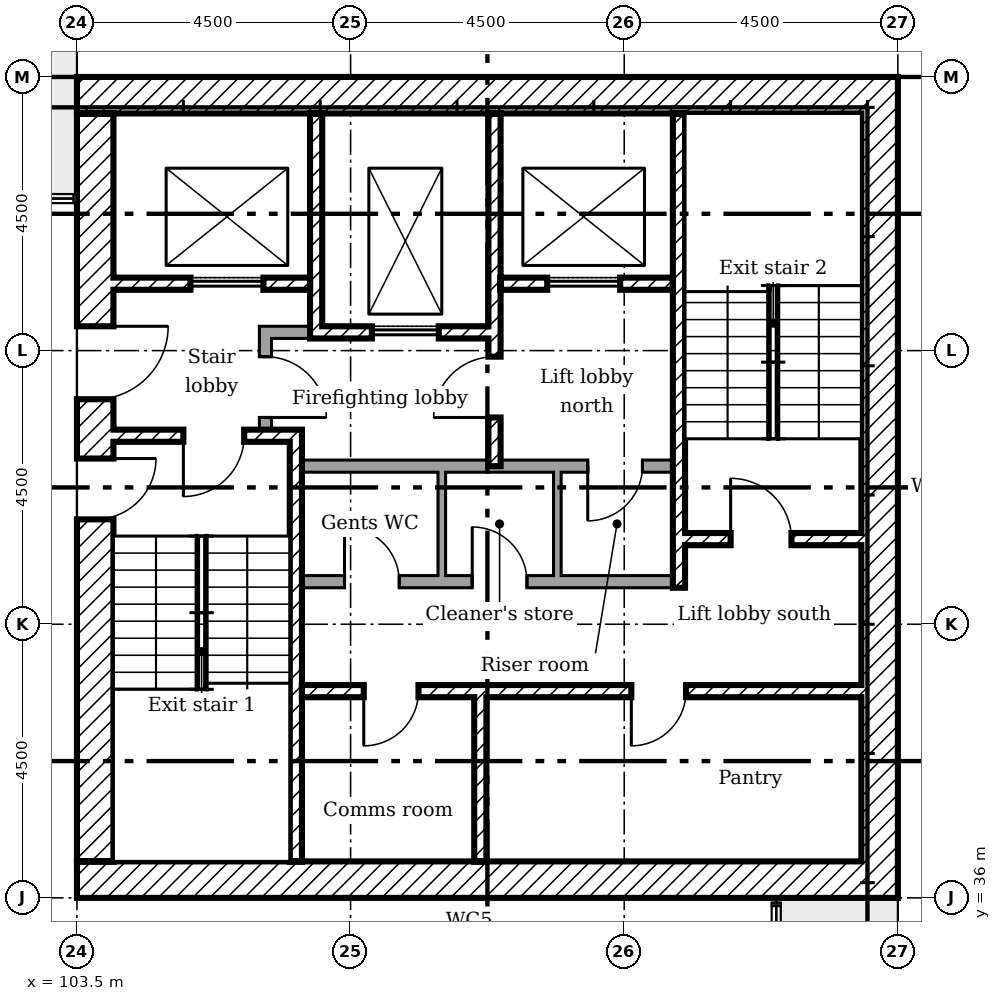
"""IFC4 building model, lengths in metres.
Left out: names, types, materials, properties, quantities, classifications, styles, units other than length and angle.
Written with IfcOpenShell. Run it as: python <this file> out.ifc"""

import sys

from ifc_helpers import new_model, si_unit, direction, frame, frame_2d, origin, place, context, subcontext, project, spatial, rectangle, extrude, element, fill, save


model = new_model("IFC4")
c1 = context("Model", 3, precision=1e-05, world=origin(), true_north=direction((0.0, 1.0)))
c2 = subcontext(c1, "Body", "Model", "MODEL_VIEW")
j1 = project(units=[si_unit("LENGTHUNIT", "METRE"), si_unit("PLANEANGLEUNIT", "RADIAN")], contexts=[c1])
p1 = place(None, origin())
s1 = spatial("IfcSite", under=j1, at=p1, CompositionType="ELEMENT")
p2 = place(p1, origin())
s2 = spatial("IfcBuilding", under=s1, at=p2, CompositionType="ELEMENT")
p3 = place(p2, frame((0.0, 0.0, 165.4)))
s3 = spatial("IfcBuildingStorey", under=s2, at=p3, CompositionType="ELEMENT", Elevation=165.4)
p4 = place(p3, frame((116.7, 36.0, 0.0), z_axis=(0.0, 0.0, 1.0), x_axis=(0.0, 1.0, 0.0)))
e1 = element("IfcWall", 1, at=p4, inside=s3, PredefinedType="SHEAR", context=c2, shape_type="SweptSolid", body=[
    extrude(rectangle(XDim=13.5, YDim=0.6, at=frame_2d((6.75, 0.0))), origin(), (0.0, 0.0, 1.0), 3.35),
])
for number, where in (
    (2, (103.5, 49.2, 0.0)),
    (3, (103.5, 36.3, 0.0)),
):
    element("IfcWall", number, at=place(p3, frame(where)), inside=s3, PredefinedType="SHEAR", context=c2, shape_type="SweptSolid", body=[
        extrude(rectangle(XDim=12.9, YDim=0.6, at=frame_2d((6.45, 0.0))), origin(), (0.0, 0.0, 1.0), 3.35),
    ])
p5 = place(p3, frame((103.8, 36.6, 0.0), z_axis=(0.0, 0.0, 1.0), x_axis=(0.0, 1.0, 0.0)))
e4 = element("IfcWall", 4, at=p5, inside=s3, PredefinedType="SHEAR", context=c2, shape_type="SweptSolid", body=[
    extrude(rectangle(XDim=12.3, YDim=0.6, at=frame_2d((6.15, 0.0))), origin(), (0.0, 0.0, 1.0), 3.35),
])
p6 = place(p5, frame((7.6, 0.0, 0.0)))
e5 = element("IfcOpeningElement", 5, at=p6, cuts=e4, PredefinedType="OPENING", context=c2, shape_type="SweptSolid", body=[
    extrude(rectangle(XDim=1.2, YDim=2.1, at=frame_2d((0.6, 1.05))), frame((0.0, 0.31, 0.0), z_axis=(0.0, -1.0, 0.0), x_axis=(1.0, 0.0, 0.0)), (0.0, 0.0, 1.0), 0.62),
])
p7 = place(p5, frame((5.625, 0.0, 0.0)))
e6 = element("IfcOpeningElement", 6, at=p7, cuts=e4, PredefinedType="OPENING", context=c2, shape_type="SweptSolid", body=[
    extrude(rectangle(XDim=1.0, YDim=2.1, at=frame_2d((0.5, 1.05))), frame((0.0, 0.31, 0.0), z_axis=(0.0, -1.0, 0.0), x_axis=(1.0, 0.0, 0.0)), (0.0, 0.0, 1.0), 0.62),
])
p8 = place(p3, frame((107.433, 48.9, 0.0), z_axis=(0.0, 0.0, 1.0), x_axis=(0.0, -1.0, 0.0)))
e7 = element("IfcWall", 7, at=p8, inside=s3, PredefinedType="SHEAR", context=c2, shape_type="SweptSolid", body=[
    extrude(rectangle(XDim=3.7, YDim=0.2, at=frame_2d((1.85, 0.0))), origin(), (0.0, 0.0, 1.0), 3.35),
])
p9 = place(p3, frame((110.367, 48.9, 0.0), z_axis=(0.0, 0.0, 1.0), x_axis=(0.0, -1.0, 0.0)))
e8 = element("IfcWall", 8, at=p9, inside=s3, PredefinedType="SHEAR", context=c2, shape_type="SweptSolid", body=[
    extrude(rectangle(XDim=5.8, YDim=0.2, at=frame_2d((2.9, 0.0))), origin(), (0.0, 0.0, 1.0), 3.35),
])
p10 = place(p9, frame((4.0, 0.0, 0.0)))
e9 = element("IfcOpeningElement", 9, at=p10, cuts=e8, PredefinedType="OPENING", context=c2, shape_type="SweptSolid", body=[
    extrude(rectangle(XDim=1.0, YDim=2.1, at=frame_2d((0.5, 1.05))), frame((0.0, 0.11, 0.0), z_axis=(0.0, -1.0, 0.0), x_axis=(1.0, 0.0, 0.0)), (0.0, 0.0, 1.0), 0.22),
])
p11 = place(p3, frame((110.133, 36.6, 0.0), z_axis=(0.0, 0.0, 1.0), x_axis=(0.0, 1.0, 0.0)))
e10 = element("IfcWall", 10, at=p11, inside=s3, PredefinedType="SHEAR", context=c2, shape_type="SweptSolid", body=[
    extrude(rectangle(XDim=2.7, YDim=0.2, at=frame_2d((1.35, 0.0))), origin(), (0.0, 0.0, 1.0), 3.35),
])
p12 = place(p3, frame((106.5, 45.3, 0.0)))
e11 = element("IfcWall", 11, at=p12, inside=s3, PredefinedType="PARTITIONING", context=c2, shape_type="SweptSolid", body=[
    extrude(rectangle(XDim=0.833, YDim=0.2, at=frame_2d((0.417, 0.0))), origin(), (0.0, 0.0, 1.0), 3.35),
])
p13 = place(p3, frame((106.6, 43.7, 0.0), z_axis=(0.0, 0.0, 1.0), x_axis=(0.0, 1.0, 0.0)))
e12 = element("IfcWall", 12, at=p13, inside=s3, PredefinedType="PARTITIONING", context=c2, shape_type="SweptSolid", body=[
    extrude(rectangle(XDim=1.5, YDim=0.2, at=frame_2d((0.75, 0.0))), origin(), (0.0, 0.0, 1.0), 3.35),
])
p14 = place(p13, frame((0.2, 0.0, 0.0)))
e13 = element("IfcOpeningElement", 13, at=p14, cuts=e12, PredefinedType="OPENING", context=c2, shape_type="SweptSolid", body=[
    extrude(rectangle(XDim=1.0, YDim=2.1, at=frame_2d((0.5, 1.05))), frame((0.0, 0.11, 0.0), z_axis=(0.0, -1.0, 0.0), x_axis=(1.0, 0.0, 0.0)), (0.0, 0.0, 1.0), 0.22),
])
p15 = place(p3, frame((104.1, 46.1, 0.0)))
e14 = element("IfcWall", 14, at=p15, inside=s3, PredefinedType="SHEAR", context=c2, shape_type="SweptSolid", body=[
    extrude(rectangle(XDim=3.233, YDim=0.2, at=frame_2d((1.617, 0.0))), origin(), (0.0, 0.0, 1.0), 3.35),
])
p16 = place(p15, frame((1.267, 0.0, 0.0)))
e15 = element("IfcOpeningElement", 15, at=p16, cuts=e14, PredefinedType="OPENING", context=c2, shape_type="SweptSolid", body=[
    extrude(rectangle(XDim=1.2, YDim=2.1, at=frame_2d((0.6, 1.05))), frame((0.0, 0.11, 0.0), z_axis=(0.0, -1.0, 0.0), x_axis=(1.0, 0.0, 0.0)), (0.0, 0.0, 1.0), 0.22),
])
p17 = place(p3, frame((110.467, 46.1, 0.0)))
e16 = element("IfcWall", 16, at=p17, inside=s3, PredefinedType="SHEAR", context=c2, shape_type="SweptSolid", body=[
    extrude(rectangle(XDim=2.833, YDim=0.2, at=frame_2d((1.417, 0.0))), origin(), (0.0, 0.0, 1.0), 3.35),
])
p18 = place(p17, frame((0.767, 0.0, 0.0)))
e17 = element("IfcOpeningElement", 17, at=p18, cuts=e16, PredefinedType="OPENING", context=c2, shape_type="SweptSolid", body=[
    extrude(rectangle(XDim=1.2, YDim=2.1, at=frame_2d((0.6, 1.05))), frame((0.0, 0.11, 0.0), z_axis=(0.0, -1.0, 0.0), x_axis=(1.0, 0.0, 0.0)), (0.0, 0.0, 1.0), 0.22),
])
p19 = place(p3, frame((107.533, 45.3, 0.0)))
e18 = element("IfcWall", 18, at=p19, inside=s3, PredefinedType="SHEAR", context=c2, shape_type="SweptSolid", body=[
    extrude(rectangle(XDim=2.733, YDim=0.2, at=frame_2d((1.367, 0.0))), origin(), (0.0, 0.0, 1.0), 3.35),
])
p20 = place(p19, frame((0.817, 0.0, 0.0)))
e19 = element("IfcOpeningElement", 19, at=p20, cuts=e18, PredefinedType="OPENING", context=c2, shape_type="SweptSolid", body=[
    extrude(rectangle(XDim=1.1, YDim=2.1, at=frame_2d((0.55, 1.05))), frame((0.0, 0.11, 0.0), z_axis=(0.0, -1.0, 0.0), x_axis=(1.0, 0.0, 0.0)), (0.0, 0.0, 1.0), 0.22),
])
p21 = place(p3, frame((107.2, 39.4, 0.0)))
e20 = element("IfcWall", 20, at=p21, inside=s3, PredefinedType="SHEAR", context=c2, shape_type="SweptSolid", body=[
    extrude(rectangle(XDim=9.2, YDim=0.2, at=frame_2d((4.6, 0.0))), origin(), (0.0, 0.0, 1.0), 3.35),
])
p22 = place(p21, frame((1.017, 0.0, 0.0)))
e21 = element("IfcOpeningElement", 21, at=p22, cuts=e20, PredefinedType="OPENING", context=c2, shape_type="SweptSolid", body=[
    extrude(rectangle(XDim=0.9, YDim=2.1, at=frame_2d((0.45, 1.05))), frame((0.0, 0.11, 0.0), z_axis=(0.0, -1.0, 0.0), x_axis=(1.0, 0.0, 0.0)), (0.0, 0.0, 1.0), 0.22),
])
p23 = place(p21, frame((5.417, 0.0, 0.0)))
e22 = element("IfcOpeningElement", 22, at=p23, cuts=e20, PredefinedType="OPENING", context=c2, shape_type="SweptSolid", body=[
    extrude(rectangle(XDim=0.9, YDim=2.1, at=frame_2d((0.45, 1.05))), frame((0.0, 0.11, 0.0), z_axis=(0.0, -1.0, 0.0), x_axis=(1.0, 0.0, 0.0)), (0.0, 0.0, 1.0), 0.22),
])
p24 = place(p3, frame((107.1, 36.6, 0.0), z_axis=(0.0, 0.0, 1.0), x_axis=(0.0, 1.0, 0.0)))
e23 = element("IfcWall", 23, at=p24, inside=s3, PredefinedType="SHEAR", context=c2, shape_type="SweptSolid", body=[
    extrude(rectangle(XDim=7.1, YDim=0.2, at=frame_2d((3.55, 0.0))), origin(), (0.0, 0.0, 1.0), 3.35),
])
p25 = place(p3, frame((104.1, 43.6, 0.0)))
e24 = element("IfcWall", 24, at=p25, inside=s3, PredefinedType="SHEAR", context=c2, shape_type="SweptSolid", body=[
    extrude(rectangle(XDim=2.9, YDim=0.2, at=frame_2d((1.45, 0.0))), origin(), (0.0, 0.0, 1.0), 3.35),
])
p26 = place(p25, frame((1.15, 0.0, 0.0)))
e25 = element("IfcOpeningElement", 25, at=p26, cuts=e24, PredefinedType="OPENING", context=c2, shape_type="SweptSolid", body=[
    extrude(rectangle(XDim=1.0, YDim=2.1, at=frame_2d((0.5, 1.05))), frame((0.0, 0.11, 0.0), z_axis=(0.0, -1.0, 0.0), x_axis=(1.0, 0.0, 0.0)), (0.0, 0.0, 1.0), 0.22),
])
p27 = place(p3, frame((113.5, 41.9, 0.0)))
e26 = element("IfcWall", 26, at=p27, inside=s3, PredefinedType="SHEAR", context=c2, shape_type="SweptSolid", body=[
    extrude(rectangle(XDim=2.9, YDim=0.2, at=frame_2d((1.45, 0.0))), origin(), (0.0, 0.0, 1.0), 3.35),
])
p28 = place(p27, frame((0.75, 0.0, 0.0)))
e27 = element("IfcOpeningElement", 27, at=p28, cuts=e26, PredefinedType="OPENING", context=c2, shape_type="SweptSolid", body=[
    extrude(rectangle(XDim=1.0, YDim=2.1, at=frame_2d((0.5, 1.05))), frame((0.0, 0.11, 0.0), z_axis=(0.0, -1.0, 0.0), x_axis=(1.0, 0.0, 0.0)), (0.0, 0.0, 1.0), 0.22),
])
p29 = place(p3, frame((113.4, 41.1, 0.0), z_axis=(0.0, 0.0, 1.0), x_axis=(0.0, 1.0, 0.0)))
e28 = element("IfcWall", 28, at=p29, inside=s3, PredefinedType="SHEAR", context=c2, shape_type="SweptSolid", body=[
    extrude(rectangle(XDim=7.8, YDim=0.2, at=frame_2d((3.9, 0.0))), origin(), (0.0, 0.0, 1.0), 3.35),
])
p30 = place(p3, frame((107.2, 43.1, 0.0)))
e29 = element("IfcWall", 29, at=p30, inside=s3, PredefinedType="PARTITIONING", context=c2, shape_type="SweptSolid", body=[
    extrude(rectangle(XDim=6.1, YDim=0.2, at=frame_2d((3.05, 0.0))), origin(), (0.0, 0.0, 1.0), 3.35),
])
p31 = place(p30, frame((4.7, 0.0, 0.0)))
e30 = element("IfcOpeningElement", 30, at=p31, cuts=e29, PredefinedType="OPENING", context=c2, shape_type="SweptSolid", body=[
    extrude(rectangle(XDim=0.9, YDim=2.1, at=frame_2d((0.45, 1.05))), frame((0.0, 0.11, 0.0), z_axis=(0.0, -1.0, 0.0), x_axis=(1.0, 0.0, 0.0)), (0.0, 0.0, 1.0), 0.22),
])
p32 = place(p3, frame((107.2, 41.2, 0.0)))
e31 = element("IfcWall", 31, at=p32, inside=s3, PredefinedType="PARTITIONING", context=c2, shape_type="SweptSolid", body=[
    extrude(rectangle(XDim=6.1, YDim=0.2, at=frame_2d((3.05, 0.0))), origin(), (0.0, 0.0, 1.0), 3.35),
])
p33 = place(p32, frame((0.7, 0.0, 0.0)))
e32 = element("IfcOpeningElement", 32, at=p33, cuts=e31, PredefinedType="OPENING", context=c2, shape_type="SweptSolid", body=[
    extrude(rectangle(XDim=0.9, YDim=2.1, at=frame_2d((0.45, 1.05))), frame((0.0, 0.11, 0.0), z_axis=(0.0, -1.0, 0.0), x_axis=(1.0, 0.0, 0.0)), (0.0, 0.0, 1.0), 0.22),
])
p34 = place(p32, frame((2.8, 0.0, 0.0)))
e33 = element("IfcOpeningElement", 33, at=p34, cuts=e31, PredefinedType="OPENING", context=c2, shape_type="SweptSolid", body=[
    extrude(rectangle(XDim=0.9, YDim=2.1, at=frame_2d((0.45, 1.05))), frame((0.0, 0.11, 0.0), z_axis=(0.0, -1.0, 0.0), x_axis=(1.0, 0.0, 0.0)), (0.0, 0.0, 1.0), 0.22),
])
for number, where, z_axis, x_axis in (
    (34, (109.5, 41.3, 0.0), (0.0, 0.0, 1.0), (0.0, 1.0, 0.0)),
    (35, (111.4, 41.3, 0.0), (0.0, 0.0, 1.0), (0.0, 1.0, 0.0)),
):
    element("IfcWall", number, at=place(p3, frame(where, z_axis=z_axis, x_axis=x_axis)), inside=s3, PredefinedType="PARTITIONING", context=c2, shape_type="SweptSolid", body=[
        extrude(rectangle(XDim=1.7, YDim=0.125, at=frame_2d((0.85, 0.0))), origin(), (0.0, 0.0, 1.0), 3.35),
    ])
p35 = place(p6, frame((1.2, 0.0, 0.0), x_axis=(-1.0, 0.0, 0.0)))
e36 = element("IfcDoor", 36, at=p35, inside=s3, OperationType="SINGLE_SWING_RIGHT", PredefinedType="DOOR", context=c2, shape_type="SweptSolid", body=[
    extrude(rectangle(XDim=1.2, YDim=2.1, at=frame_2d((0.6, 1.05))), frame((0.0, 0.025, 0.0), z_axis=(0.0, -1.0, 0.0), x_axis=(1.0, 0.0, 0.0)), (0.0, 0.0, 1.0), 0.05),
])
fill(e5, e36)
p36 = place(p26, frame((1.0, 0.0, 0.0), x_axis=(-1.0, 0.0, 0.0)))
e37 = element("IfcDoor", 37, at=p36, inside=s3, OperationType="SINGLE_SWING_LEFT", PredefinedType="DOOR", context=c2, shape_type="SweptSolid", body=[
    extrude(rectangle(XDim=1.0, YDim=2.1, at=frame_2d((0.5, 1.05))), frame((0.0, 0.025, 0.0), z_axis=(0.0, -1.0, 0.0), x_axis=(1.0, 0.0, 0.0)), (0.0, 0.0, 1.0), 0.05),
])
fill(e25, e37)
p37 = place(p7, frame((1.0, 0.0, 0.0), x_axis=(-1.0, 0.0, 0.0)))
e38 = element("IfcDoor", 38, at=p37, inside=s3, OperationType="SINGLE_SWING_RIGHT", PredefinedType="DOOR", context=c2, shape_type="SweptSolid", body=[
    extrude(rectangle(XDim=1.0, YDim=2.1, at=frame_2d((0.5, 1.05))), frame((0.0, 0.025, 0.0), z_axis=(0.0, -1.0, 0.0), x_axis=(1.0, 0.0, 0.0)), (0.0, 0.0, 1.0), 0.05),
])
fill(e6, e38)
p38 = place(p28, origin())
e39 = element("IfcDoor", 39, at=p38, inside=s3, OperationType="SINGLE_SWING_RIGHT", PredefinedType="DOOR", context=c2, shape_type="SweptSolid", body=[
    extrude(rectangle(XDim=1.0, YDim=2.1, at=frame_2d((0.5, 1.05))), frame((0.0, 0.025, 0.0), z_axis=(0.0, -1.0, 0.0), x_axis=(1.0, 0.0, 0.0)), (0.0, 0.0, 1.0), 0.05),
])
fill(e27, e39)
p39 = place(p10, frame((1.0, 0.0, 0.0), x_axis=(-1.0, 0.0, 0.0)))
e40 = element("IfcDoor", 40, at=p39, inside=s3, OperationType="SINGLE_SWING_RIGHT", PredefinedType="DOOR", context=c2, shape_type="SweptSolid", body=[
    extrude(rectangle(XDim=1.0, YDim=2.1, at=frame_2d((0.5, 1.05))), frame((0.0, 0.025, 0.0), z_axis=(0.0, -1.0, 0.0), x_axis=(1.0, 0.0, 0.0)), (0.0, 0.0, 1.0), 0.05),
])
fill(e9, e40)
p40 = place(p14, frame((1.0, 0.0, 0.0), x_axis=(-1.0, 0.0, 0.0)))
e41 = element("IfcDoor", 41, at=p40, inside=s3, OperationType="SINGLE_SWING_LEFT", PredefinedType="DOOR", context=c2, shape_type="SweptSolid", body=[
    extrude(rectangle(XDim=1.0, YDim=2.1, at=frame_2d((0.5, 1.05))), frame((0.0, 0.025, 0.0), z_axis=(0.0, -1.0, 0.0), x_axis=(1.0, 0.0, 0.0)), (0.0, 0.0, 1.0), 0.05),
])
fill(e13, e41)
p41 = place(p22, frame((0.9, 0.0, 0.0), x_axis=(-1.0, 0.0, 0.0)))
e42 = element("IfcDoor", 42, at=p41, inside=s3, OperationType="SINGLE_SWING_LEFT", PredefinedType="DOOR", context=c2, shape_type="SweptSolid", body=[
    extrude(rectangle(XDim=0.9, YDim=2.1, at=frame_2d((0.45, 1.05))), frame((0.0, 0.025, 0.0), z_axis=(0.0, -1.0, 0.0), x_axis=(1.0, 0.0, 0.0)), (0.0, 0.0, 1.0), 0.05),
])
fill(e21, e42)
p42 = place(p23, frame((0.9, 0.0, 0.0), x_axis=(-1.0, 0.0, 0.0)))
e43 = element("IfcDoor", 43, at=p42, inside=s3, OperationType="SINGLE_SWING_LEFT", PredefinedType="DOOR", context=c2, shape_type="SweptSolid", body=[
    extrude(rectangle(XDim=0.9, YDim=2.1, at=frame_2d((0.45, 1.05))), frame((0.0, 0.025, 0.0), z_axis=(0.0, -1.0, 0.0), x_axis=(1.0, 0.0, 0.0)), (0.0, 0.0, 1.0), 0.05),
])
fill(e22, e43)
p43 = place(p33, origin())
e44 = element("IfcDoor", 44, at=p43, inside=s3, OperationType="SINGLE_SWING_RIGHT", PredefinedType="DOOR", context=c2, shape_type="SweptSolid", body=[
    extrude(rectangle(XDim=0.9, YDim=2.1, at=frame_2d((0.45, 1.05))), frame((0.0, 0.025, 0.0), z_axis=(0.0, -1.0, 0.0), x_axis=(1.0, 0.0, 0.0)), (0.0, 0.0, 1.0), 0.05),
])
fill(e32, e44)
p44 = place(p34, origin())
e45 = element("IfcDoor", 45, at=p44, inside=s3, OperationType="SINGLE_SWING_RIGHT", PredefinedType="DOOR", context=c2, shape_type="SweptSolid", body=[
    extrude(rectangle(XDim=0.9, YDim=2.1, at=frame_2d((0.45, 1.05))), frame((0.0, 0.025, 0.0), z_axis=(0.0, -1.0, 0.0), x_axis=(1.0, 0.0, 0.0)), (0.0, 0.0, 1.0), 0.05),
])
fill(e33, e45)
p45 = place(p31, frame((0.9, 0.0, 0.0), x_axis=(-1.0, 0.0, 0.0)))
e46 = element("IfcDoor", 46, at=p45, inside=s3, OperationType="SINGLE_SWING_LEFT", PredefinedType="DOOR", context=c2, shape_type="SweptSolid", body=[
    extrude(rectangle(XDim=0.9, YDim=2.1, at=frame_2d((0.45, 1.05))), frame((0.0, 0.025, 0.0), z_axis=(0.0, -1.0, 0.0), x_axis=(1.0, 0.0, 0.0)), (0.0, 0.0, 1.0), 0.05),
])
fill(e30, e46)
p46 = place(p20, origin())
e47 = element("IfcDoor", 47, at=p46, inside=s3, OperationType="SLIDING_TO_LEFT", PredefinedType="DOOR", context=c2, shape_type="SweptSolid", body=[
    extrude(rectangle(XDim=1.1, YDim=2.1, at=frame_2d((0.55, 1.05))), frame((0.0, 0.025, 0.0), z_axis=(0.0, -1.0, 0.0), x_axis=(1.0, 0.0, 0.0)), (0.0, 0.0, 1.0), 0.05),
])
fill(e19, e47)
p47 = place(p16, origin())
e48 = element("IfcDoor", 48, at=p47, inside=s3, OperationType="SLIDING_TO_LEFT", PredefinedType="DOOR", context=c2, shape_type="SweptSolid", body=[
    extrude(rectangle(XDim=1.2, YDim=2.1, at=frame_2d((0.6, 1.05))), frame((0.0, 0.025, 0.0), z_axis=(0.0, -1.0, 0.0), x_axis=(1.0, 0.0, 0.0)), (0.0, 0.0, 1.0), 0.05),
])
fill(e15, e48)
p48 = place(p18, origin())
e49 = element("IfcDoor", 49, at=p48, inside=s3, OperationType="SLIDING_TO_LEFT", PredefinedType="DOOR", context=c2, shape_type="SweptSolid", body=[
    extrude(rectangle(XDim=1.2, YDim=2.1, at=frame_2d((0.6, 1.05))), frame((0.0, 0.025, 0.0), z_axis=(0.0, -1.0, 0.0), x_axis=(1.0, 0.0, 0.0)), (0.0, 0.0, 1.0), 0.05),
])
fill(e17, e49)
save(model, sys.argv[1])
